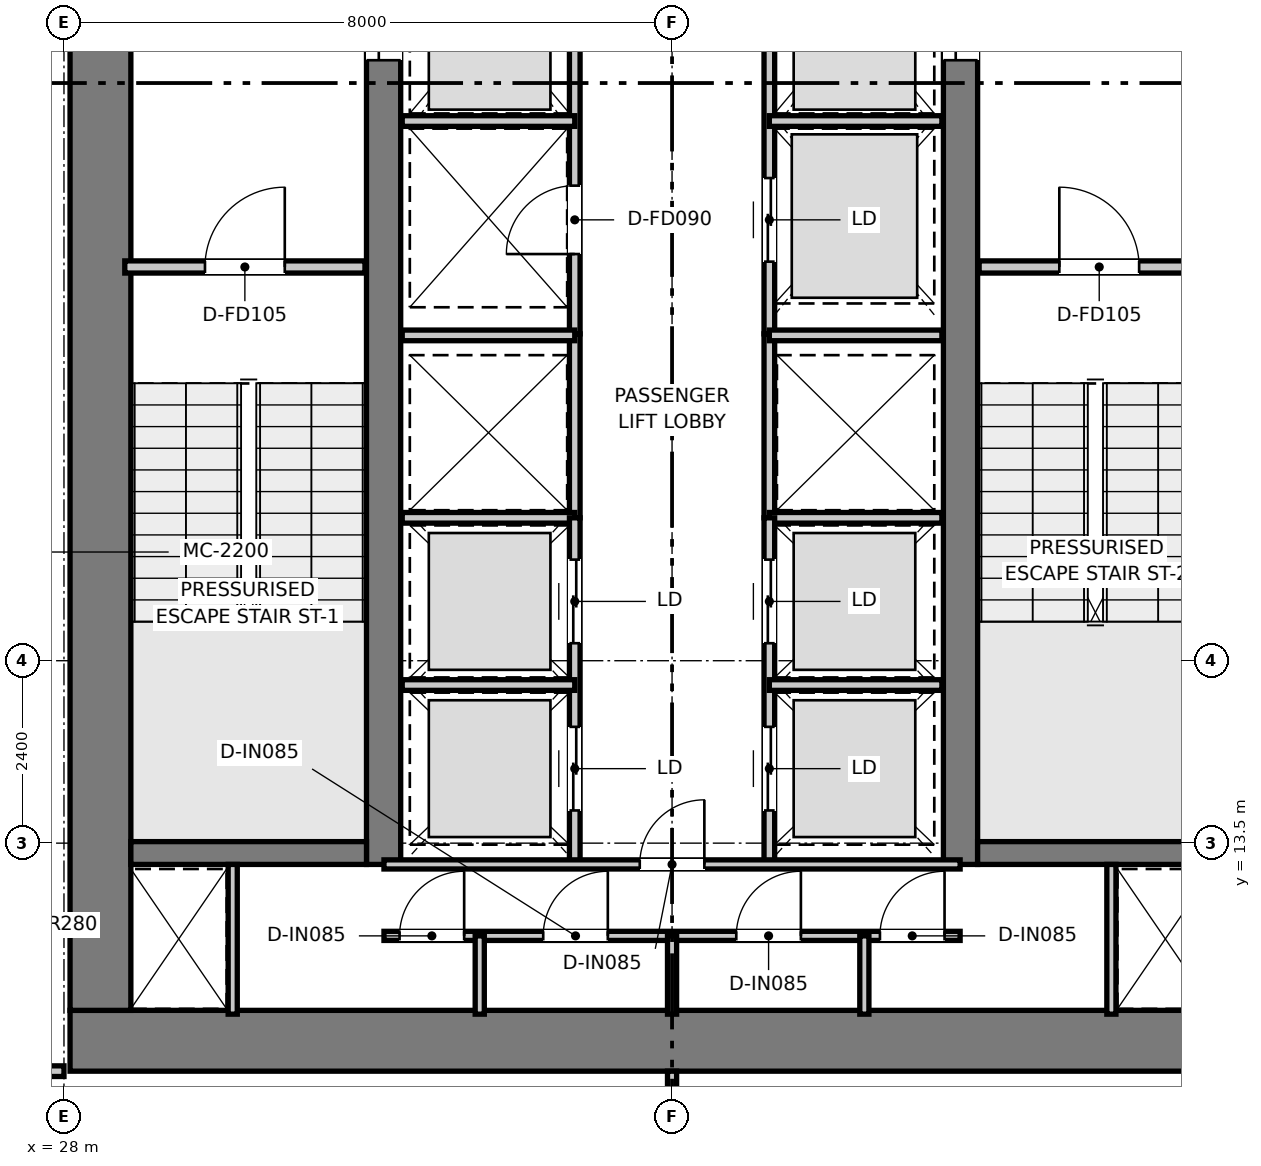
"""IFC4 building model, lengths in metres.
Left out: names, types, materials, properties, quantities, classifications, styles, units other than length and angle.
Written with IfcOpenShell. Run it as: python <this file> out.ifc"""

import sys

from ifc_helpers import new_model, si_unit, direction, frame, frame_2d, origin, place, context, subcontext, project, spatial, rectangle, extrude, element, fill, save


model = new_model("IFC4")
c1 = context("Model", 3, precision=1e-05, world=origin(), true_north=direction((0.0, 1.0)))
c2 = subcontext(c1, "Body", "Model", "MODEL_VIEW")
j1 = project(units=[si_unit("LENGTHUNIT", "METRE"), si_unit("PLANEANGLEUNIT", "RADIAN")], contexts=[c1])
p1 = place(None, origin())
s1 = spatial("IfcSite", under=j1, at=p1, CompositionType="ELEMENT")
p2 = place(p1, origin())
s2 = spatial("IfcBuilding", under=s1, at=p2, CompositionType="ELEMENT")
p3 = place(p2, frame((0.0, 0.0, 25.0)))
s3 = spatial("IfcBuildingStorey", under=s2, at=p3, CompositionType="ELEMENT", Elevation=25.0)
p4 = place(p3, frame((28.08, 10.9, 0.0), z_axis=(0.0, 0.0, 1.0), x_axis=(1.0, 0.0, 0.0)))
e1 = element("IfcWall", 1, at=p4, inside=s3, PredefinedType="SHEAR", context=c2, shape_type="SweptSolid", body=[
    extrude(rectangle(XDim=15.84, YDim=0.8, at=frame_2d((7.92, 0.0))), origin(), (0.0, 0.0, 1.0), 3.95),
])
p5 = place(p3, frame((28.48, 11.3, 0.0), z_axis=(0.0, 0.0, 1.0), x_axis=(0.0, 1.0, 0.0)))
e2 = element("IfcWall", 2, at=p5, inside=s3, PredefinedType="SHEAR", context=c2, shape_type="SweptSolid", body=[
    extrude(rectangle(XDim=14.7, YDim=0.8, at=frame_2d((7.35, 0.0))), origin(), (0.0, 0.0, 1.0), 3.95),
])
p6 = place(p3, frame((32.205, 13.22, 0.0), z_axis=(0.0, 0.0, 1.0), x_axis=(0.0, 1.0, 0.0)))
e3 = element("IfcWall", 3, at=p6, inside=s3, PredefinedType="SHEAR", context=c2, shape_type="SweptSolid", body=[
    extrude(rectangle(XDim=12.78, YDim=0.45, at=frame_2d((6.39, 0.0))), origin(), (0.0, 0.0, 1.0), 3.95),
])
p7 = place(p6, frame((10.58, 0.0, 0.0)))
e4 = element("IfcOpeningElement", 4, at=p7, cuts=e3, PredefinedType="OPENING", context=c2, shape_type="SweptSolid", body=[
    extrude(rectangle(XDim=1.1, YDim=2.15, at=frame_2d((0.55, 1.075))), frame((0.0, 0.235, 0.0), z_axis=(0.0, -1.0, 0.0), x_axis=(1.0, 0.0, 0.0)), (0.0, 0.0, 1.0), 0.47),
])
p8 = place(p3, frame((39.795, 13.22, 0.0), z_axis=(0.0, 0.0, 1.0), x_axis=(0.0, 1.0, 0.0)))
e5 = element("IfcWall", 5, at=p8, inside=s3, PredefinedType="SHEAR", context=c2, shape_type="SweptSolid", body=[
    extrude(rectangle(XDim=12.78, YDim=0.45, at=frame_2d((6.39, 0.0))), origin(), (0.0, 0.0, 1.0), 3.95),
])
p9 = place(p8, frame((10.58, 0.0, 0.0)))
e6 = element("IfcOpeningElement", 6, at=p9, cuts=e5, PredefinedType="OPENING", context=c2, shape_type="SweptSolid", body=[
    extrude(rectangle(XDim=1.1, YDim=2.15, at=frame_2d((0.55, 1.075))), frame((0.0, 0.235, 0.0), z_axis=(0.0, -1.0, 0.0), x_axis=(1.0, 0.0, 0.0)), (0.0, 0.0, 1.0), 0.47),
])
for number, where, z_axis, x_axis in (
    (7, (28.88, 13.37, 0.0), (0.0, 0.0, 1.0), (1.0, 0.0, 0.0)),
    (8, (40.02, 13.37, 0.0), (0.0, 0.0, 1.0), (1.0, 0.0, 0.0)),
):
    element("IfcWall", number, at=place(p3, frame(where, z_axis=z_axis, x_axis=x_axis)), inside=s3, PredefinedType="SHEAR", context=c2, shape_type="SweptSolid", body=[
        extrude(rectangle(XDim=3.1, YDim=0.3, at=frame_2d((1.55, 0.0))), origin(), (0.0, 0.0, 1.0), 3.95),
    ])
p10 = place(p3, frame((28.8, 21.08, 0.0), z_axis=(0.0, 0.0, 1.0), x_axis=(1.0, 0.0, 0.0)))
e9 = element("IfcWall", 9, at=p10, inside=s3, PredefinedType="PARTITIONING", context=c2, shape_type="SweptSolid", body=[
    extrude(rectangle(XDim=3.16, YDim=0.16, at=frame_2d((1.58, 0.0))), origin(), (0.0, 0.0, 1.0), 3.67),
])
p11 = place(p10, frame((1.055, 0.0, 0.0)))
e10 = element("IfcOpeningElement", 10, at=p11, cuts=e9, PredefinedType="OPENING", context=c2, shape_type="SweptSolid", body=[
    extrude(rectangle(XDim=1.05, YDim=2.1, at=frame_2d((0.525, 1.05))), frame((0.0, 0.09, 0.0), z_axis=(0.0, -1.0, 0.0), x_axis=(1.0, 0.0, 0.0)), (0.0, 0.0, 1.0), 0.18),
])
p12 = place(p3, frame((40.04, 21.08, 0.0), z_axis=(0.0, 0.0, 1.0), x_axis=(1.0, 0.0, 0.0)))
e11 = element("IfcWall", 11, at=p12, inside=s3, PredefinedType="PARTITIONING", context=c2, shape_type="SweptSolid", body=[
    extrude(rectangle(XDim=3.16, YDim=0.16, at=frame_2d((1.58, 0.0))), origin(), (0.0, 0.0, 1.0), 3.67),
])
p13 = place(p12, frame((1.055, 0.0, 0.0)))
e12 = element("IfcOpeningElement", 12, at=p13, cuts=e11, PredefinedType="OPENING", context=c2, shape_type="SweptSolid", body=[
    extrude(rectangle(XDim=1.05, YDim=2.1, at=frame_2d((0.525, 1.05))), frame((0.0, 0.09, 0.0), z_axis=(0.0, -1.0, 0.0), x_axis=(1.0, 0.0, 0.0)), (0.0, 0.0, 1.0), 0.18),
])
p14 = place(p3, frame((34.72, 20.2, 0.0), z_axis=(0.0, 0.0, 1.0), x_axis=(0.0, 1.0, 0.0)))
e13 = element("IfcWall", 13, at=p14, inside=s3, PredefinedType="PARTITIONING", context=c2, shape_type="SweptSolid", body=[
    extrude(rectangle(XDim=5.78, YDim=0.14, at=frame_2d((2.89, 0.0))), origin(), (0.0, 0.0, 1.0), 2.47),
])
p15 = place(p14, frame((1.05, 0.0, 0.0)))
e14 = element("IfcOpeningElement", 14, at=p15, cuts=e13, PredefinedType="OPENING", context=c2, shape_type="SweptSolid", body=[
    extrude(rectangle(XDim=0.9, YDim=2.1, at=frame_2d((0.45, 1.05))), frame((0.0, 0.08, 0.0), z_axis=(0.0, -1.0, 0.0), x_axis=(1.0, 0.0, 0.0)), (0.0, 0.0, 1.0), 0.16),
])
p16 = place(p3, frame((37.28, 20.2, 0.0), z_axis=(0.0, 0.0, 1.0), x_axis=(0.0, 1.0, 0.0)))
e15 = element("IfcWall", 15, at=p16, inside=s3, PredefinedType="PARTITIONING", context=c2, shape_type="SweptSolid", body=[
    extrude(rectangle(XDim=5.78, YDim=0.14, at=frame_2d((2.89, 0.0))), origin(), (0.0, 0.0, 1.0), 2.47),
])
p17 = place(p16, frame((0.95, 0.0, 0.0)))
e16 = element("IfcOpeningElement", 16, at=p17, cuts=e15, PredefinedType="OPENING", context=c2, shape_type="SweptSolid", body=[
    extrude(rectangle(XDim=1.1, YDim=2.15, at=frame_2d((0.55, 1.075))), frame((0.0, 0.08, 0.0), z_axis=(0.0, -1.0, 0.0), x_axis=(1.0, 0.0, 0.0)), (0.0, 0.0, 1.0), 0.16),
])
for number, where, z_axis, x_axis in (
    (17, (32.45, 23.0, 0.0), (0.0, 0.0, 1.0), (1.0, 0.0, 0.0)),
    (18, (37.28, 23.0, 0.0), (0.0, 0.0, 1.0), (1.0, 0.0, 0.0)),
):
    element("IfcWall", number, at=place(p3, frame(where, z_axis=z_axis, x_axis=x_axis)), inside=s3, PredefinedType="PARTITIONING", context=c2, shape_type="SweptSolid", body=[
        extrude(rectangle(XDim=2.27, YDim=0.14, at=frame_2d((1.135, 0.0))), origin(), (0.0, 0.0, 1.0), 2.47),
    ])
for number, where, z_axis, x_axis in (
    (19, (34.72, 17.78, 0.0), (0.0, 0.0, 1.0), (0.0, 1.0, 0.0)),
    (20, (37.28, 17.78, 0.0), (0.0, 0.0, 1.0), (0.0, 1.0, 0.0)),
):
    element("IfcWall", number, at=place(p3, frame(where, z_axis=z_axis, x_axis=x_axis)), inside=s3, PredefinedType="PARTITIONING", context=c2, shape_type="SweptSolid", body=[
        extrude(rectangle(XDim=2.42, YDim=0.14, at=frame_2d((1.21, 0.0))), origin(), (0.0, 0.0, 1.0), 3.67),
    ])
for number, where, z_axis, x_axis in (
    (21, (32.45, 17.78, 0.0), (0.0, 0.0, 1.0), (1.0, 0.0, 0.0)),
    (22, (32.45, 20.18, 0.0), (0.0, 0.0, 1.0), (1.0, 0.0, 0.0)),
    (23, (37.28, 17.78, 0.0), (0.0, 0.0, 1.0), (1.0, 0.0, 0.0)),
    (24, (37.28, 20.18, 0.0), (0.0, 0.0, 1.0), (1.0, 0.0, 0.0)),
):
    element("IfcWall", number, at=place(p3, frame(where, z_axis=z_axis, x_axis=x_axis)), inside=s3, PredefinedType="PARTITIONING", context=c2, shape_type="SweptSolid", body=[
        extrude(rectangle(XDim=2.27, YDim=0.14, at=frame_2d((1.135, 0.0))), origin(), (0.0, 0.0, 1.0), 3.67),
    ])
p18 = place(p3, frame((34.72, 13.22, 0.0), z_axis=(0.0, 0.0, 1.0), x_axis=(0.0, 1.0, 0.0)))
e25 = element("IfcWall", 25, at=p18, inside=s3, PredefinedType="PARTITIONING", context=c2, shape_type="SweptSolid", body=[
    extrude(rectangle(XDim=4.56, YDim=0.14, at=frame_2d((2.28, 0.0))), origin(), (0.0, 0.0, 1.0), 3.67),
])
p19 = place(p18, frame((0.71, 0.0, 0.0)))
e26 = element("IfcOpeningElement", 26, at=p19, cuts=e25, PredefinedType="OPENING", context=c2, shape_type="SweptSolid", body=[
    extrude(rectangle(XDim=1.1, YDim=2.15, at=frame_2d((0.55, 1.075))), frame((0.0, 0.08, 0.0), z_axis=(0.0, -1.0, 0.0), x_axis=(1.0, 0.0, 0.0)), (0.0, 0.0, 1.0), 0.16),
])
p20 = place(p18, frame((2.91, 0.0, 0.0)))
e27 = element("IfcOpeningElement", 27, at=p20, cuts=e25, PredefinedType="OPENING", context=c2, shape_type="SweptSolid", body=[
    extrude(rectangle(XDim=1.1, YDim=2.15, at=frame_2d((0.55, 1.075))), frame((0.0, 0.08, 0.0), z_axis=(0.0, -1.0, 0.0), x_axis=(1.0, 0.0, 0.0)), (0.0, 0.0, 1.0), 0.16),
])
p21 = place(p3, frame((32.45, 15.58, 0.0), z_axis=(0.0, 0.0, 1.0), x_axis=(1.0, 0.0, 0.0)))
e28 = element("IfcWall", 28, at=p21, inside=s3, PredefinedType="PARTITIONING", context=c2, shape_type="SweptSolid", body=[
    extrude(rectangle(XDim=2.27, YDim=0.14, at=frame_2d((1.135, 0.0))), origin(), (0.0, 0.0, 1.0), 3.67),
])
p22 = place(p3, frame((37.28, 13.22, 0.0), z_axis=(0.0, 0.0, 1.0), x_axis=(0.0, 1.0, 0.0)))
e29 = element("IfcWall", 29, at=p22, inside=s3, PredefinedType="PARTITIONING", context=c2, shape_type="SweptSolid", body=[
    extrude(rectangle(XDim=4.56, YDim=0.14, at=frame_2d((2.28, 0.0))), origin(), (0.0, 0.0, 1.0), 3.67),
])
p23 = place(p22, frame((0.71, 0.0, 0.0)))
e30 = element("IfcOpeningElement", 30, at=p23, cuts=e29, PredefinedType="OPENING", context=c2, shape_type="SweptSolid", body=[
    extrude(rectangle(XDim=1.1, YDim=2.15, at=frame_2d((0.55, 1.075))), frame((0.0, 0.08, 0.0), z_axis=(0.0, -1.0, 0.0), x_axis=(1.0, 0.0, 0.0)), (0.0, 0.0, 1.0), 0.16),
])
p24 = place(p22, frame((2.91, 0.0, 0.0)))
e31 = element("IfcOpeningElement", 31, at=p24, cuts=e29, PredefinedType="OPENING", context=c2, shape_type="SweptSolid", body=[
    extrude(rectangle(XDim=1.1, YDim=2.15, at=frame_2d((0.55, 1.075))), frame((0.0, 0.08, 0.0), z_axis=(0.0, -1.0, 0.0), x_axis=(1.0, 0.0, 0.0)), (0.0, 0.0, 1.0), 0.16),
])
p25 = place(p3, frame((37.28, 15.58, 0.0), z_axis=(0.0, 0.0, 1.0), x_axis=(1.0, 0.0, 0.0)))
e32 = element("IfcWall", 32, at=p25, inside=s3, PredefinedType="PARTITIONING", context=c2, shape_type="SweptSolid", body=[
    extrude(rectangle(XDim=2.27, YDim=0.14, at=frame_2d((1.135, 0.0))), origin(), (0.0, 0.0, 1.0), 3.67),
])
for number, where, z_axis, x_axis in (
    (33, (30.22, 11.25, 0.0), (0.0, 0.0, 1.0), (0.0, 1.0, 0.0)),
    (34, (41.78, 11.25, 0.0), (0.0, 0.0, 1.0), (0.0, 1.0, 0.0)),
):
    element("IfcWall", number, at=place(p3, frame(where, z_axis=z_axis, x_axis=x_axis)), inside=s3, PredefinedType="PARTITIONING", context=c2, shape_type="SweptSolid", body=[
        extrude(rectangle(XDim=1.97, YDim=0.12, at=frame_2d((0.985, 0.0))), origin(), (0.0, 0.0, 1.0), 3.67),
    ])
p26 = place(p3, frame((32.21, 13.22, 0.0), z_axis=(0.0, 0.0, 1.0), x_axis=(1.0, 0.0, 0.0)))
e35 = element("IfcWall", 35, at=p26, inside=s3, PredefinedType="PARTITIONING", context=c2, shape_type="SweptSolid", body=[
    extrude(rectangle(XDim=7.58, YDim=0.12, at=frame_2d((3.79, 0.0))), origin(), (0.0, 0.0, 1.0), 3.67),
])
p27 = place(p26, frame((3.365, 0.0, 0.0)))
e36 = element("IfcOpeningElement", 36, at=p27, cuts=e35, PredefinedType="OPENING", context=c2, shape_type="SweptSolid", body=[
    extrude(rectangle(XDim=0.85, YDim=2.1, at=frame_2d((0.425, 1.05))), frame((0.0, 0.07, 0.0), z_axis=(0.0, -1.0, 0.0), x_axis=(1.0, 0.0, 0.0)), (0.0, 0.0, 1.0), 0.14),
])
p28 = place(p3, frame((32.21, 12.28, 0.0), z_axis=(0.0, 0.0, 1.0), x_axis=(1.0, 0.0, 0.0)))
e37 = element("IfcWall", 37, at=p28, inside=s3, PredefinedType="PARTITIONING", context=c2, shape_type="SweptSolid", body=[
    extrude(rectangle(XDim=7.58, YDim=0.12, at=frame_2d((3.79, 0.0))), origin(), (0.0, 0.0, 1.0), 3.67),
])
p29 = place(p28, frame((0.205, 0.0, 0.0)))
e38 = element("IfcOpeningElement", 38, at=p29, cuts=e37, PredefinedType="OPENING", context=c2, shape_type="SweptSolid", body=[
    extrude(rectangle(XDim=0.85, YDim=2.1, at=frame_2d((0.425, 1.05))), frame((0.0, 0.07, 0.0), z_axis=(0.0, -1.0, 0.0), x_axis=(1.0, 0.0, 0.0)), (0.0, 0.0, 1.0), 0.14),
])
p30 = place(p28, frame((2.095, 0.0, 0.0)))
e39 = element("IfcOpeningElement", 39, at=p30, cuts=e37, PredefinedType="OPENING", context=c2, shape_type="SweptSolid", body=[
    extrude(rectangle(XDim=0.85, YDim=2.1, at=frame_2d((0.425, 1.05))), frame((0.0, 0.07, 0.0), z_axis=(0.0, -1.0, 0.0), x_axis=(1.0, 0.0, 0.0)), (0.0, 0.0, 1.0), 0.14),
])
p31 = place(p28, frame((4.635, 0.0, 0.0)))
e40 = element("IfcOpeningElement", 40, at=p31, cuts=e37, PredefinedType="OPENING", context=c2, shape_type="SweptSolid", body=[
    extrude(rectangle(XDim=0.85, YDim=2.1, at=frame_2d((0.425, 1.05))), frame((0.0, 0.07, 0.0), z_axis=(0.0, -1.0, 0.0), x_axis=(1.0, 0.0, 0.0)), (0.0, 0.0, 1.0), 0.14),
])
p32 = place(p28, frame((6.525, 0.0, 0.0)))
e41 = element("IfcOpeningElement", 41, at=p32, cuts=e37, PredefinedType="OPENING", context=c2, shape_type="SweptSolid", body=[
    extrude(rectangle(XDim=0.85, YDim=2.1, at=frame_2d((0.425, 1.05))), frame((0.0, 0.07, 0.0), z_axis=(0.0, -1.0, 0.0), x_axis=(1.0, 0.0, 0.0)), (0.0, 0.0, 1.0), 0.14),
])
for number, where, z_axis, x_axis in (
    (42, (33.47, 11.25, 0.0), (0.0, 0.0, 1.0), (0.0, 1.0, 0.0)),
    (43, (36.0, 11.25, 0.0), (0.0, 0.0, 1.0), (0.0, 1.0, 0.0)),
    (44, (38.53, 11.25, 0.0), (0.0, 0.0, 1.0), (0.0, 1.0, 0.0)),
):
    element("IfcWall", number, at=place(p3, frame(where, z_axis=z_axis, x_axis=x_axis)), inside=s3, PredefinedType="PARTITIONING", context=c2, shape_type="SweptSolid", body=[
        extrude(rectangle(XDim=1.03, YDim=0.12, at=frame_2d((0.515, 0.0))), origin(), (0.0, 0.0, 1.0), 3.67),
    ])
p33 = place(p3, frame((26.32, 10.5, 0.0), z_axis=(0.0, 0.0, 1.0), x_axis=(1.0, 0.0, 0.0)))
e45 = element("IfcWall", 45, at=p33, inside=s3, PredefinedType="PARTITIONING", context=c2, shape_type="SweptSolid", body=[
    extrude(rectangle(XDim=1.68, YDim=0.14, at=frame_2d((0.84, 0.0))), origin(), (0.0, 0.0, 1.0), 3.67),
])
p34 = place(p33, frame((0.445, 0.0, 0.0)))
e46 = element("IfcOpeningElement", 46, at=p34, cuts=e45, PredefinedType="OPENING", context=c2, shape_type="SweptSolid", body=[
    extrude(rectangle(XDim=0.85, YDim=2.1, at=frame_2d((0.425, 1.05))), frame((0.0, 0.08, 0.0), z_axis=(0.0, -1.0, 0.0), x_axis=(1.0, 0.0, 0.0)), (0.0, 0.0, 1.0), 0.16),
])
p35 = place(p3, frame((36.0, 1.79, 0.0), z_axis=(0.0, 0.0, 1.0), x_axis=(0.0, 1.0, 0.0)))
e47 = element("IfcWall", 47, at=p35, inside=s3, PredefinedType="PARTITIONING", context=c2, shape_type="SweptSolid", body=[
    extrude(rectangle(XDim=8.71, YDim=0.12, at=frame_2d((4.355, 0.0))), origin(), (0.0, 0.0, 1.0), 3.67),
])
p36 = place(p11, origin())
e48 = element("IfcDoor", 48, at=p36, inside=s3, OperationType="SINGLE_SWING_RIGHT", PredefinedType="DOOR", context=c2, shape_type="SweptSolid", body=[
    extrude(rectangle(XDim=1.05, YDim=2.1, at=frame_2d((0.525, 1.05))), frame((0.0, 0.025, 0.0), z_axis=(0.0, -1.0, 0.0), x_axis=(1.0, 0.0, 0.0)), (0.0, 0.0, 1.0), 0.05),
])
fill(e10, e48)
p37 = place(p13, origin())
e49 = element("IfcDoor", 49, at=p37, inside=s3, OperationType="SINGLE_SWING_LEFT", PredefinedType="DOOR", context=c2, shape_type="SweptSolid", body=[
    extrude(rectangle(XDim=1.05, YDim=2.1, at=frame_2d((0.525, 1.05))), frame((0.0, 0.025, 0.0), z_axis=(0.0, -1.0, 0.0), x_axis=(1.0, 0.0, 0.0)), (0.0, 0.0, 1.0), 0.05),
])
fill(e12, e49)
p38 = place(p7, origin())
e50 = element("IfcDoor", 50, at=p38, inside=s3, OperationType="DOUBLE_DOOR_SLIDING", PredefinedType="DOOR", context=c2, shape_type="SweptSolid", body=[
    extrude(rectangle(XDim=1.1, YDim=2.15, at=frame_2d((0.55, 1.075))), frame((0.0, 0.025, 0.0), z_axis=(0.0, -1.0, 0.0), x_axis=(1.0, 0.0, 0.0)), (0.0, 0.0, 1.0), 0.05),
])
fill(e4, e50)
p39 = place(p9, origin())
e51 = element("IfcDoor", 51, at=p39, inside=s3, OperationType="DOUBLE_DOOR_SLIDING", PredefinedType="DOOR", context=c2, shape_type="SweptSolid", body=[
    extrude(rectangle(XDim=1.1, YDim=2.15, at=frame_2d((0.55, 1.075))), frame((0.0, 0.025, 0.0), z_axis=(0.0, -1.0, 0.0), x_axis=(1.0, 0.0, 0.0)), (0.0, 0.0, 1.0), 0.05),
])
fill(e6, e51)
p40 = place(p15, origin())
e52 = element("IfcDoor", 52, at=p40, inside=s3, OperationType="SINGLE_SWING_LEFT", PredefinedType="DOOR", context=c2, shape_type="SweptSolid", body=[
    extrude(rectangle(XDim=0.9, YDim=2.1, at=frame_2d((0.45, 1.05))), frame((0.0, 0.025, 0.0), z_axis=(0.0, -1.0, 0.0), x_axis=(1.0, 0.0, 0.0)), (0.0, 0.0, 1.0), 0.05),
])
fill(e14, e52)
p41 = place(p17, origin())
e53 = element("IfcDoor", 53, at=p41, inside=s3, OperationType="DOUBLE_DOOR_SLIDING", PredefinedType="DOOR", context=c2, shape_type="SweptSolid", body=[
    extrude(rectangle(XDim=1.1, YDim=2.15, at=frame_2d((0.55, 1.075))), frame((0.0, 0.025, 0.0), z_axis=(0.0, -1.0, 0.0), x_axis=(1.0, 0.0, 0.0)), (0.0, 0.0, 1.0), 0.05),
])
fill(e16, e53)
p42 = place(p19, origin())
e54 = element("IfcDoor", 54, at=p42, inside=s3, OperationType="DOUBLE_DOOR_SLIDING", PredefinedType="DOOR", context=c2, shape_type="SweptSolid", body=[
    extrude(rectangle(XDim=1.1, YDim=2.15, at=frame_2d((0.55, 1.075))), frame((0.0, 0.025, 0.0), z_axis=(0.0, -1.0, 0.0), x_axis=(1.0, 0.0, 0.0)), (0.0, 0.0, 1.0), 0.05),
])
fill(e26, e54)
p43 = place(p20, origin())
e55 = element("IfcDoor", 55, at=p43, inside=s3, OperationType="DOUBLE_DOOR_SLIDING", PredefinedType="DOOR", context=c2, shape_type="SweptSolid", body=[
    extrude(rectangle(XDim=1.1, YDim=2.15, at=frame_2d((0.55, 1.075))), frame((0.0, 0.025, 0.0), z_axis=(0.0, -1.0, 0.0), x_axis=(1.0, 0.0, 0.0)), (0.0, 0.0, 1.0), 0.05),
])
fill(e27, e55)
p44 = place(p23, origin())
e56 = element("IfcDoor", 56, at=p44, inside=s3, OperationType="DOUBLE_DOOR_SLIDING", PredefinedType="DOOR", context=c2, shape_type="SweptSolid", body=[
    extrude(rectangle(XDim=1.1, YDim=2.15, at=frame_2d((0.55, 1.075))), frame((0.0, 0.025, 0.0), z_axis=(0.0, -1.0, 0.0), x_axis=(1.0, 0.0, 0.0)), (0.0, 0.0, 1.0), 0.05),
])
fill(e30, e56)
p45 = place(p24, origin())
e57 = element("IfcDoor", 57, at=p45, inside=s3, OperationType="DOUBLE_DOOR_SLIDING", PredefinedType="DOOR", context=c2, shape_type="SweptSolid", body=[
    extrude(rectangle(XDim=1.1, YDim=2.15, at=frame_2d((0.55, 1.075))), frame((0.0, 0.025, 0.0), z_axis=(0.0, -1.0, 0.0), x_axis=(1.0, 0.0, 0.0)), (0.0, 0.0, 1.0), 0.05),
])
fill(e31, e57)
p46 = place(p27, origin())
e58 = element("IfcDoor", 58, at=p46, inside=s3, OperationType="SINGLE_SWING_RIGHT", PredefinedType="DOOR", context=c2, shape_type="SweptSolid", body=[
    extrude(rectangle(XDim=0.85, YDim=2.1, at=frame_2d((0.425, 1.05))), frame((0.0, 0.025, 0.0), z_axis=(0.0, -1.0, 0.0), x_axis=(1.0, 0.0, 0.0)), (0.0, 0.0, 1.0), 0.05),
])
fill(e36, e58)
p47 = place(p29, origin())
e59 = element("IfcDoor", 59, at=p47, inside=s3, OperationType="SINGLE_SWING_RIGHT", PredefinedType="DOOR", context=c2, shape_type="SweptSolid", body=[
    extrude(rectangle(XDim=0.85, YDim=2.1, at=frame_2d((0.425, 1.05))), frame((0.0, 0.025, 0.0), z_axis=(0.0, -1.0, 0.0), x_axis=(1.0, 0.0, 0.0)), (0.0, 0.0, 1.0), 0.05),
])
fill(e38, e59)
p48 = place(p30, origin())
e60 = element("IfcDoor", 60, at=p48, inside=s3, OperationType="SINGLE_SWING_RIGHT", PredefinedType="DOOR", context=c2, shape_type="SweptSolid", body=[
    extrude(rectangle(XDim=0.85, YDim=2.1, at=frame_2d((0.425, 1.05))), frame((0.0, 0.025, 0.0), z_axis=(0.0, -1.0, 0.0), x_axis=(1.0, 0.0, 0.0)), (0.0, 0.0, 1.0), 0.05),
])
fill(e39, e60)
p49 = place(p31, origin())
e61 = element("IfcDoor", 61, at=p49, inside=s3, OperationType="SINGLE_SWING_RIGHT", PredefinedType="DOOR", context=c2, shape_type="SweptSolid", body=[
    extrude(rectangle(XDim=0.85, YDim=2.1, at=frame_2d((0.425, 1.05))), frame((0.0, 0.025, 0.0), z_axis=(0.0, -1.0, 0.0), x_axis=(1.0, 0.0, 0.0)), (0.0, 0.0, 1.0), 0.05),
])
fill(e40, e61)
p50 = place(p32, origin())
e62 = element("IfcDoor", 62, at=p50, inside=s3, OperationType="SINGLE_SWING_RIGHT", PredefinedType="DOOR", context=c2, shape_type="SweptSolid", body=[
    extrude(rectangle(XDim=0.85, YDim=2.1, at=frame_2d((0.425, 1.05))), frame((0.0, 0.025, 0.0), z_axis=(0.0, -1.0, 0.0), x_axis=(1.0, 0.0, 0.0)), (0.0, 0.0, 1.0), 0.05),
])
fill(e41, e62)
save(model, sys.argv[1])
